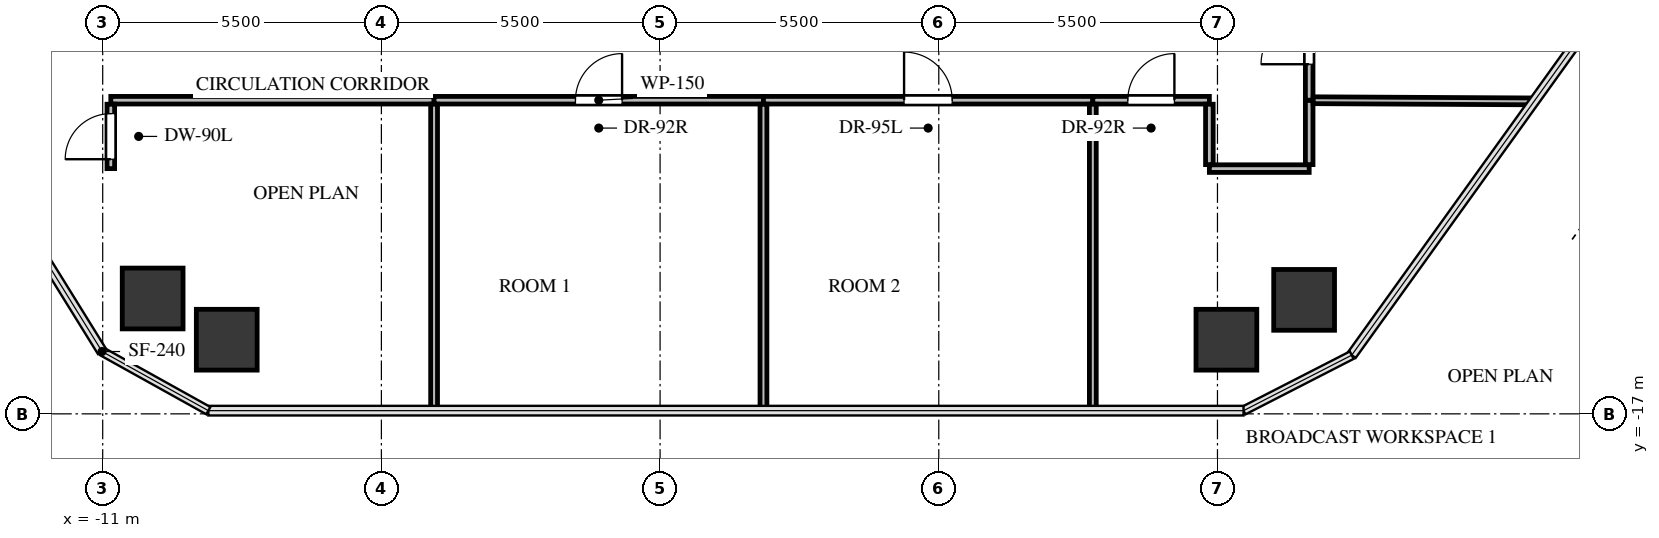
"""IFC4 building model, lengths in metres.
Left out: names, types, materials, properties, quantities, classifications, styles, units other than length and angle.
Written with IfcOpenShell. Run it as: python <this file> out.ifc"""

import sys

from ifc_helpers import new_model, si_unit, direction, frame, frame_2d, origin, origin_2d, place, context, subcontext, project, spatial, rectangle, extrude, source, transform, mapped, element, fill, save


model = new_model("IFC4")
c1 = context("Model", 3, precision=1e-05, world=origin(), true_north=direction((0.0, 1.0)))
c2 = subcontext(c1, "Body", "Model", "MODEL_VIEW")
j1 = project(units=[si_unit("LENGTHUNIT", "METRE"), si_unit("PLANEANGLEUNIT", "RADIAN")], contexts=[c1])
p1 = place(None, origin())
s1 = spatial("IfcSite", under=j1, at=p1, CompositionType="ELEMENT")
p2 = place(p1, origin())
s2 = spatial("IfcBuilding", under=s1, at=p2, CompositionType="ELEMENT")
p3 = place(p2, frame((0.0, 0.0, 120.6)))
s3 = spatial("IfcBuildingStorey", under=s2, at=p3, CompositionType="ELEMENT", Elevation=120.6)
m1 = source(origin(), c2, "Body", "SweptSolid", [
    extrude(rectangle(XDim=1.2, YDim=1.2, at=origin_2d()), origin(), (0.0, 0.0, 1.0), 3.3),
])
for number, where, z_axis, x_axis in (
    (1, (-10.014, -14.723, -0.24), (0.0, 0.0, 1.0), (1.0, 0.0, 0.0)),
    (2, (12.71, -14.75, -0.24), (0.0, 0.0, 1.0), (1.0, 0.0, 0.0)),
    (3, (11.176, -15.537, -0.24), (0.0, 0.0, 1.0), (1.0, 0.0, 0.0)),
    (4, (-8.552, -15.537, -0.24), (0.0, 0.0, 1.0), (1.0, 0.0, 0.0)),
):
    element("IfcColumn", number, at=place(p3, frame(where, z_axis=z_axis, x_axis=x_axis)), inside=s3, PredefinedType="COLUMN", context=c2, shape_type="MappedRepresentation", body=[
        mapped(m1, transform((0.0, 0.0, 0.0), x_axis=(1.0, 0.0, 0.0), y_axis=(0.0, 1.0, 0.0), z_axis=(0.0, 0.0, 1.0), scale=1.0)),
    ])
p4 = place(p3, frame((-10.84, -10.81, 0.0), z_axis=(0.0, 0.0, 1.0), x_axis=(1.0, 0.0, 0.0)))
e5 = element("IfcWall", 5, at=p4, inside=s3, PredefinedType="PARTITIONING", context=c2, shape_type="SweptSolid", body=[
    extrude(rectangle(XDim=6.38, YDim=0.15, at=frame_2d((3.19, 0.0))), origin(), (0.0, 0.0, 1.0), 2.212),
])
p5 = place(p3, frame((-10.84, -12.16, 0.0), z_axis=(0.0, 0.0, 1.0), x_axis=(0.0, 1.0, 0.0)))
e6 = element("IfcWall", 6, at=p5, inside=s3, PredefinedType="PARTITIONING", context=c2, shape_type="SweptSolid", body=[
    extrude(rectangle(XDim=1.271, YDim=0.15, at=frame_2d((0.635, 0.0))), origin(), (0.0, 0.0, 1.0), 3.045),
])
p6 = place(p5, frame((0.186, 0.0, 0.0)))
e7 = element("IfcOpeningElement", 7, at=p6, cuts=e6, PredefinedType="OPENING", context=c2, shape_type="SweptSolid", body=[
    extrude(rectangle(XDim=0.9, YDim=2.05, at=frame_2d((0.45, 1.025))), frame((0.0, 0.085, 0.0), z_axis=(0.0, -1.0, 0.0), x_axis=(1.0, 0.0, 0.0)), (0.0, 0.0, 1.0), 0.17),
])
p7 = place(p3, frame((-4.46, -10.81, 0.0), z_axis=(0.0, 0.0, 1.0), x_axis=(1.0, 0.0, 0.0)))
e8 = element("IfcWall", 8, at=p7, inside=s3, PredefinedType="PARTITIONING", context=c2, shape_type="SweptSolid", body=[
    extrude(rectangle(XDim=6.5, YDim=0.15, at=frame_2d((3.25, 0.0))), origin(), (0.0, 0.0, 1.0), 3.045),
])
p8 = place(p7, frame((2.79, 0.0, 0.0)))
e9 = element("IfcOpeningElement", 9, at=p8, cuts=e8, PredefinedType="OPENING", context=c2, shape_type="SweptSolid", body=[
    extrude(rectangle(XDim=0.92, YDim=2.1, at=frame_2d((0.46, 1.05))), frame((0.0, 0.085, 0.0), z_axis=(0.0, -1.0, 0.0), x_axis=(1.0, 0.0, 0.0)), (0.0, 0.0, 1.0), 0.17),
])
p9 = place(p3, frame((2.04, -10.81, 0.0), z_axis=(0.0, 0.0, 1.0), x_axis=(1.0, 0.0, 0.0)))
e10 = element("IfcWall", 10, at=p9, inside=s3, PredefinedType="PARTITIONING", context=c2, shape_type="SweptSolid", body=[
    extrude(rectangle(XDim=6.5, YDim=0.15, at=frame_2d((3.25, 0.0))), origin(), (0.0, 0.0, 1.0), 2.212),
])
p10 = place(p9, frame((2.775, 0.0, 0.0)))
e11 = element("IfcOpeningElement", 11, at=p10, cuts=e10, PredefinedType="OPENING", context=c2, shape_type="SweptSolid", body=[
    extrude(rectangle(XDim=0.95, YDim=2.1, at=frame_2d((0.475, 1.05))), frame((0.0, 0.085, 0.0), z_axis=(0.0, -1.0, 0.0), x_axis=(1.0, 0.0, 0.0)), (0.0, 0.0, 1.0), 0.17),
])
p11 = place(p3, frame((8.54, -10.81, 0.0), z_axis=(0.0, 0.0, 1.0), x_axis=(1.0, 0.0, 0.0)))
e12 = element("IfcWall", 12, at=p11, inside=s3, PredefinedType="PARTITIONING", context=c2, shape_type="SweptSolid", body=[
    extrude(rectangle(XDim=2.3, YDim=0.15, at=frame_2d((1.15, 0.0))), origin(), (0.0, 0.0, 1.0), 3.045),
])
p12 = place(p11, frame((0.69, 0.0, 0.0)))
e13 = element("IfcOpeningElement", 13, at=p12, cuts=e12, PredefinedType="OPENING", context=c2, shape_type="SweptSolid", body=[
    extrude(rectangle(XDim=0.92, YDim=2.1, at=frame_2d((0.46, 1.05))), frame((0.0, 0.085, 0.0), z_axis=(0.0, -1.0, 0.0), x_axis=(1.0, 0.0, 0.0)), (0.0, 0.0, 1.0), 0.17),
])
p13 = place(p3, frame((10.84, -12.16, 0.0), z_axis=(0.0, 0.0, 1.0), x_axis=(1.0, 0.0, 0.0)))
e14 = element("IfcWall", 14, at=p13, inside=s3, PredefinedType="PARTITIONING", context=c2, shape_type="SweptSolid", body=[
    extrude(rectangle(XDim=1.97, YDim=0.15, at=frame_2d((0.985, 0.0))), origin(), (0.0, 0.0, 1.0), 3.045),
])
p14 = place(p3, frame((10.84, -10.889, 0.0), z_axis=(0.0, 0.0, 1.0), x_axis=(0.0, -1.0, 0.0)))
e15 = element("IfcWall", 15, at=p14, inside=s3, PredefinedType="PARTITIONING", context=c2, shape_type="SweptSolid", body=[
    extrude(rectangle(XDim=1.192, YDim=0.15, at=frame_2d((0.596, 0.0))), origin(), (0.0, 0.0, 1.0), 3.045),
])
p15 = place(p3, frame((12.81, -12.081, 0.0), z_axis=(0.0, 0.0, 1.0), x_axis=(0.0, 1.0, 0.0)))
e16 = element("IfcWall", 16, at=p15, inside=s3, PredefinedType="PARTITIONING", context=c2, shape_type="SweptSolid", body=[
    extrude(rectangle(XDim=1.271, YDim=0.15, at=frame_2d((0.635, 0.0))), origin(), (0.0, 0.0, 1.0), 3.045),
])
p16 = place(p3, frame((12.81, -10.81, 0.0), z_axis=(0.0, 0.0, 1.0), x_axis=(0.0, 1.0, 0.0)))
e17 = element("IfcWall", 17, at=p16, inside=s3, PredefinedType="PARTITIONING", context=c2, shape_type="SweptSolid", body=[
    extrude(rectangle(XDim=2.37, YDim=0.15, at=frame_2d((1.185, 0.0))), origin(), (0.0, 0.0, 1.0), 3.045),
])
p17 = place(p16, frame((0.71, 0.0, 0.0)))
e18 = element("IfcOpeningElement", 18, at=p17, cuts=e17, PredefinedType="OPENING", context=c2, shape_type="SweptSolid", body=[
    extrude(rectangle(XDim=0.95, YDim=2.1, at=frame_2d((0.475, 1.05))), frame((0.0, 0.085, 0.0), z_axis=(0.0, -1.0, 0.0), x_axis=(1.0, 0.0, 0.0)), (0.0, 0.0, 1.0), 0.17),
])
for number, where, z_axis, x_axis in (
    (19, (-4.46, -10.889, 0.0), (0.0, 0.0, 1.0), (0.0, -1.0, 0.0)),
    (20, (2.04, -10.889, 0.0), (0.0, 0.0, 1.0), (0.0, -1.0, 0.0)),
):
    element("IfcWall", number, at=place(p3, frame(where, z_axis=z_axis, x_axis=x_axis)), inside=s3, PredefinedType="PARTITIONING", context=c2, shape_type="SweptSolid", body=[
        extrude(rectangle(XDim=6.048, YDim=0.135, at=frame_2d((3.024, 0.0))), origin(), (0.0, 0.0, 1.0), 2.38),
    ])
p18 = place(p3, frame((8.54, -10.889, 0.0), z_axis=(0.0, 0.0, 1.0), x_axis=(0.0, -1.0, 0.0)))
e21 = element("IfcWall", 21, at=p18, inside=s3, PredefinedType="PARTITIONING", context=c2, shape_type="SweptSolid", body=[
    extrude(rectangle(XDim=6.048, YDim=0.135, at=frame_2d((3.024, 0.0))), origin(), (0.0, 0.0, 1.0), 2.212),
])
p19 = place(p3, frame((12.889, -10.81, 0.0), z_axis=(0.0, 0.0, 1.0), x_axis=(0.999986140562, -0.005264853658, 0.0)))
e22 = element("IfcWall", 22, at=p19, inside=s3, PredefinedType="PARTITIONING", context=c2, shape_type="SweptSolid", body=[
    extrude(rectangle(XDim=4.359, YDim=0.135, at=frame_2d((2.179, 0.0))), origin(), (0.0, 0.0, 1.0), 2.38),
])
m2 = source(origin(), c2, "Body", "SweptSolid", [
    extrude(rectangle(XDim=0.9, YDim=2.05, at=frame_2d((0.45, 1.025))), frame((0.0, 0.025, 0.0), z_axis=(0.0, -1.0, 0.0), x_axis=(1.0, 0.0, 0.0)), (0.0, 0.0, 1.0), 0.05),
])
p20 = place(p6, origin())
e23 = element("IfcDoor", 23, at=p20, inside=s3, OperationType="SINGLE_SWING_LEFT", PredefinedType="DOOR", context=c2, shape_type="MappedRepresentation", body=[
    mapped(m2, transform((0.0, 0.0, 0.0), x_axis=(1.0, 0.0, 0.0), y_axis=(0.0, 1.0, 0.0), z_axis=(0.0, 0.0, 1.0), scale=1.0)),
])
fill(e7, e23)
m3 = source(origin(), c2, "Body", "SweptSolid", [
    extrude(rectangle(XDim=0.92, YDim=2.1, at=frame_2d((0.46, 1.05))), frame((0.0, 0.025, 0.0), z_axis=(0.0, -1.0, 0.0), x_axis=(1.0, 0.0, 0.0)), (0.0, 0.0, 1.0), 0.05),
])
p21 = place(p8, origin())
e24 = element("IfcDoor", 24, at=p21, inside=s3, OperationType="SINGLE_SWING_RIGHT", PredefinedType="DOOR", context=c2, shape_type="MappedRepresentation", body=[
    mapped(m3, transform((0.0, 0.0, 0.0), x_axis=(1.0, 0.0, 0.0), y_axis=(0.0, 1.0, 0.0), z_axis=(0.0, 0.0, 1.0), scale=1.0)),
])
fill(e9, e24)
m4 = source(origin(), c2, "Body", "SweptSolid", [
    extrude(rectangle(XDim=0.95, YDim=2.1, at=frame_2d((0.475, 1.05))), frame((0.0, 0.025, 0.0), z_axis=(0.0, -1.0, 0.0), x_axis=(1.0, 0.0, 0.0)), (0.0, 0.0, 1.0), 0.05),
])
p22 = place(p10, origin())
e25 = element("IfcDoor", 25, at=p22, inside=s3, OperationType="SINGLE_SWING_LEFT", PredefinedType="DOOR", context=c2, shape_type="MappedRepresentation", body=[
    mapped(m4, transform((0.0, 0.0, 0.0), x_axis=(1.0, 0.0, 0.0), y_axis=(0.0, 1.0, 0.0), z_axis=(0.0, 0.0, 1.0), scale=1.0)),
])
fill(e11, e25)
p23 = place(p12, origin())
e26 = element("IfcDoor", 26, at=p23, inside=s3, OperationType="SINGLE_SWING_RIGHT", PredefinedType="DOOR", context=c2, shape_type="MappedRepresentation", body=[
    mapped(m3, transform((0.0, 0.0, 0.0), x_axis=(1.0, 0.0, 0.0), y_axis=(0.0, 1.0, 0.0), z_axis=(0.0, 0.0, 1.0), scale=1.0)),
])
fill(e13, e26)
p24 = place(p17, origin())
e27 = element("IfcDoor", 27, at=p24, inside=s3, OperationType="SINGLE_SWING_LEFT", PredefinedType="DOOR", context=c2, shape_type="MappedRepresentation", body=[
    mapped(m4, transform((0.0, 0.0, 0.0), x_axis=(1.0, 0.0, 0.0), y_axis=(0.0, 1.0, 0.0), z_axis=(0.0, 0.0, 1.0), scale=1.0)),
])
fill(e18, e27)
save(model, sys.argv[1])
